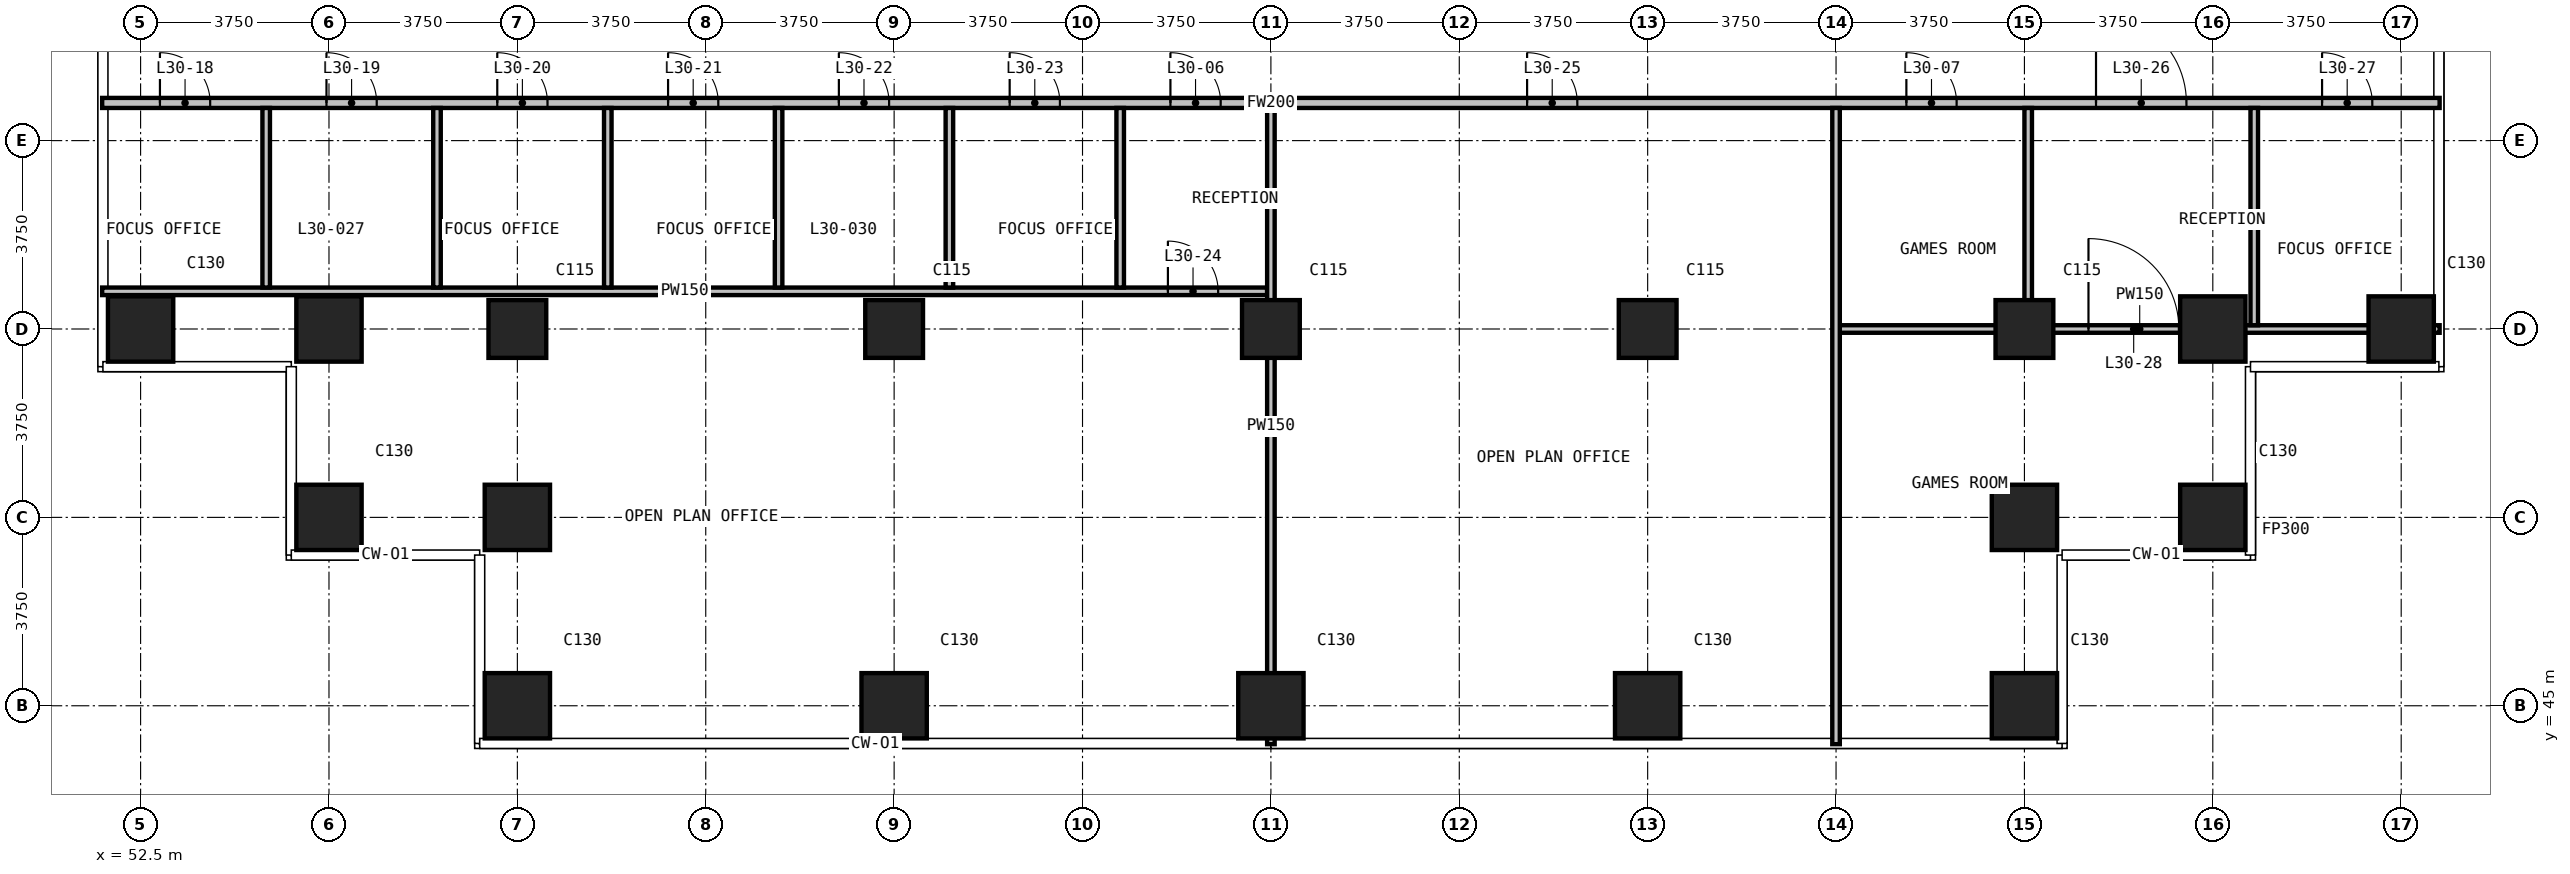
"""IFC4 building model, lengths in metres.
Left out: names, types, materials, properties, quantities, classifications, styles, units other than length and angle.
Written with IfcOpenShell. Run it as: python <this file> out.ifc"""

import sys

from ifc_helpers import new_model, si_unit, direction, frame, frame_2d, origin, origin_2d, place, context, subcontext, project, spatial, rectangle, extrude, element, fill, save


model = new_model("IFC4")
c1 = context("Model", 3, precision=1e-05, world=origin(), true_north=direction((0.0, 1.0)))
c2 = subcontext(c1, "Body", "Model", "MODEL_VIEW")
j1 = project(units=[si_unit("LENGTHUNIT", "METRE"), si_unit("PLANEANGLEUNIT", "RADIAN")], contexts=[c1])
p1 = place(None, origin())
s1 = spatial("IfcSite", under=j1, at=p1, CompositionType="ELEMENT")
p2 = place(p1, origin())
s2 = spatial("IfcBuilding", under=s1, at=p2, CompositionType="ELEMENT")
p3 = place(p2, frame((0.0, 0.0, 121.6)))
s3 = spatial("IfcBuildingStorey", under=s2, at=p3, CompositionType="ELEMENT", Elevation=121.6)
for number, where, z_axis, x_axis in (
    (1, (52.5, 52.5, 0.0), (0.0, 0.0, 1.0), (1.0, 0.0, 0.0)),
    (2, (56.25, 48.75, 0.0), (0.0, 0.0, 1.0), (1.0, 0.0, 0.0)),
    (3, (56.25, 52.5, 0.0), (0.0, 0.0, 1.0), (1.0, 0.0, 0.0)),
    (4, (60.0, 45.0, 0.0), (0.0, 0.0, 1.0), (1.0, 0.0, 0.0)),
    (5, (60.0, 48.75, 0.0), (0.0, 0.0, 1.0), (1.0, 0.0, 0.0)),
):
    element("IfcColumn", number, at=place(p3, frame(where, z_axis=z_axis, x_axis=x_axis)), inside=s3, PredefinedType="COLUMN", context=c2, shape_type="SweptSolid", body=[
        extrude(rectangle(XDim=1.3, YDim=1.3, at=origin_2d()), origin(), (0.0, 0.0, 1.0), 3.6),
    ])
p4 = place(p3, frame((60.0, 52.5, 0.0), z_axis=(0.0, 0.0, 1.0), x_axis=(1.0, 0.0, 0.0)))
e6 = element("IfcColumn", 6, at=p4, inside=s3, PredefinedType="COLUMN", context=c2, shape_type="SweptSolid", body=[
    extrude(rectangle(XDim=1.15, YDim=1.15, at=origin_2d()), origin(), (0.0, 0.0, 1.0), 3.6),
])
p5 = place(p3, frame((67.5, 45.0, 0.0), z_axis=(0.0, 0.0, 1.0), x_axis=(1.0, 0.0, 0.0)))
e7 = element("IfcColumn", 7, at=p5, inside=s3, PredefinedType="COLUMN", context=c2, shape_type="SweptSolid", body=[
    extrude(rectangle(XDim=1.3, YDim=1.3, at=origin_2d()), origin(), (0.0, 0.0, 1.0), 3.6),
])
p6 = place(p3, frame((67.5, 52.5, 0.0), z_axis=(0.0, 0.0, 1.0), x_axis=(1.0, 0.0, 0.0)))
e8 = element("IfcColumn", 8, at=p6, inside=s3, PredefinedType="COLUMN", context=c2, shape_type="SweptSolid", body=[
    extrude(rectangle(XDim=1.15, YDim=1.15, at=origin_2d()), origin(), (0.0, 0.0, 1.0), 3.6),
])
p7 = place(p3, frame((75.0, 45.0, 0.0), z_axis=(0.0, 0.0, 1.0), x_axis=(1.0, 0.0, 0.0)))
e9 = element("IfcColumn", 9, at=p7, inside=s3, PredefinedType="COLUMN", context=c2, shape_type="SweptSolid", body=[
    extrude(rectangle(XDim=1.3, YDim=1.3, at=origin_2d()), origin(), (0.0, 0.0, 1.0), 3.6),
])
p8 = place(p3, frame((75.0, 52.5, 0.0), z_axis=(0.0, 0.0, 1.0), x_axis=(1.0, 0.0, 0.0)))
e10 = element("IfcColumn", 10, at=p8, inside=s3, PredefinedType="COLUMN", context=c2, shape_type="SweptSolid", body=[
    extrude(rectangle(XDim=1.15, YDim=1.15, at=origin_2d()), origin(), (0.0, 0.0, 1.0), 3.6),
])
p9 = place(p3, frame((82.5, 45.0, 0.0), z_axis=(0.0, 0.0, 1.0), x_axis=(1.0, 0.0, 0.0)))
e11 = element("IfcColumn", 11, at=p9, inside=s3, PredefinedType="COLUMN", context=c2, shape_type="SweptSolid", body=[
    extrude(rectangle(XDim=1.3, YDim=1.3, at=origin_2d()), origin(), (0.0, 0.0, 1.0), 3.6),
])
p10 = place(p3, frame((82.5, 52.5, 0.0), z_axis=(0.0, 0.0, 1.0), x_axis=(1.0, 0.0, 0.0)))
e12 = element("IfcColumn", 12, at=p10, inside=s3, PredefinedType="COLUMN", context=c2, shape_type="SweptSolid", body=[
    extrude(rectangle(XDim=1.15, YDim=1.15, at=origin_2d()), origin(), (0.0, 0.0, 1.0), 3.6),
])
for number, where, z_axis, x_axis in (
    (13, (90.0, 45.0, 0.0), (0.0, 0.0, 1.0), (1.0, 0.0, 0.0)),
    (14, (90.0, 48.75, 0.0), (0.0, 0.0, 1.0), (1.0, 0.0, 0.0)),
):
    element("IfcColumn", number, at=place(p3, frame(where, z_axis=z_axis, x_axis=x_axis)), inside=s3, PredefinedType="COLUMN", context=c2, shape_type="SweptSolid", body=[
        extrude(rectangle(XDim=1.3, YDim=1.3, at=origin_2d()), origin(), (0.0, 0.0, 1.0), 3.6),
    ])
p11 = place(p3, frame((90.0, 52.5, 0.0), z_axis=(0.0, 0.0, 1.0), x_axis=(1.0, 0.0, 0.0)))
e15 = element("IfcColumn", 15, at=p11, inside=s3, PredefinedType="COLUMN", context=c2, shape_type="SweptSolid", body=[
    extrude(rectangle(XDim=1.15, YDim=1.15, at=origin_2d()), origin(), (0.0, 0.0, 1.0), 3.6),
])
for number, where, z_axis, x_axis in (
    (16, (93.75, 48.75, 0.0), (0.0, 0.0, 1.0), (1.0, 0.0, 0.0)),
    (17, (93.75, 52.5, 0.0), (0.0, 0.0, 1.0), (1.0, 0.0, 0.0)),
    (18, (97.5, 52.5, 0.0), (0.0, 0.0, 1.0), (1.0, 0.0, 0.0)),
):
    element("IfcColumn", number, at=place(p3, frame(where, z_axis=z_axis, x_axis=x_axis)), inside=s3, PredefinedType="COLUMN", context=c2, shape_type="SweptSolid", body=[
        extrude(rectangle(XDim=1.3, YDim=1.3, at=origin_2d()), origin(), (0.0, 0.0, 1.0), 3.6),
    ])
p12 = place(p3, frame((51.735, 57.0, 0.0), z_axis=(0.0, 0.0, 1.0), x_axis=(1.0, 0.0, 0.0)))
e19 = element("IfcWall", 19, at=p12, inside=s3, PredefinedType="PARTITIONING", context=c2, shape_type="SweptSolid", body=[
    extrude(rectangle(XDim=46.53, YDim=0.2, at=frame_2d((23.265, 0.0))), origin(), (0.0, 0.0, 1.0), 3.3),
])
p13 = place(p12, frame((21.265, 0.0, 0.0)))
e20 = element("IfcOpeningElement", 20, at=p13, cuts=e19, PredefinedType="OPENING", context=c2, shape_type="SweptSolid", body=[
    extrude(rectangle(XDim=1.0, YDim=2.2, at=frame_2d((0.5, 1.1))), frame((0.0, 0.11, 0.0), z_axis=(0.0, -1.0, 0.0), x_axis=(1.0, 0.0, 0.0)), (0.0, 0.0, 1.0), 0.22),
])
p14 = place(p12, frame((35.915, 0.0, 0.0)))
e21 = element("IfcOpeningElement", 21, at=p14, cuts=e19, PredefinedType="OPENING", context=c2, shape_type="SweptSolid", body=[
    extrude(rectangle(XDim=1.0, YDim=2.2, at=frame_2d((0.5, 1.1))), frame((0.0, 0.11, 0.0), z_axis=(0.0, -1.0, 0.0), x_axis=(1.0, 0.0, 0.0)), (0.0, 0.0, 1.0), 0.22),
])
p15 = place(p12, frame((1.15, 0.0, 0.0)))
e22 = element("IfcOpeningElement", 22, at=p15, cuts=e19, PredefinedType="OPENING", context=c2, shape_type="SweptSolid", body=[
    extrude(rectangle(XDim=1.0, YDim=2.2, at=frame_2d((0.5, 1.1))), frame((0.0, 0.11, 0.0), z_axis=(0.0, -1.0, 0.0), x_axis=(1.0, 0.0, 0.0)), (0.0, 0.0, 1.0), 0.22),
])
p16 = place(p12, frame((4.465, 0.0, 0.0)))
e23 = element("IfcOpeningElement", 23, at=p16, cuts=e19, PredefinedType="OPENING", context=c2, shape_type="SweptSolid", body=[
    extrude(rectangle(XDim=1.0, YDim=2.2, at=frame_2d((0.5, 1.1))), frame((0.0, 0.11, 0.0), z_axis=(0.0, -1.0, 0.0), x_axis=(1.0, 0.0, 0.0)), (0.0, 0.0, 1.0), 0.22),
])
p17 = place(p12, frame((7.865, 0.0, 0.0)))
e24 = element("IfcOpeningElement", 24, at=p17, cuts=e19, PredefinedType="OPENING", context=c2, shape_type="SweptSolid", body=[
    extrude(rectangle(XDim=1.0, YDim=2.2, at=frame_2d((0.5, 1.1))), frame((0.0, 0.11, 0.0), z_axis=(0.0, -1.0, 0.0), x_axis=(1.0, 0.0, 0.0)), (0.0, 0.0, 1.0), 0.22),
])
p18 = place(p12, frame((11.265, 0.0, 0.0)))
e25 = element("IfcOpeningElement", 25, at=p18, cuts=e19, PredefinedType="OPENING", context=c2, shape_type="SweptSolid", body=[
    extrude(rectangle(XDim=1.0, YDim=2.2, at=frame_2d((0.5, 1.1))), frame((0.0, 0.11, 0.0), z_axis=(0.0, -1.0, 0.0), x_axis=(1.0, 0.0, 0.0)), (0.0, 0.0, 1.0), 0.22),
])
p19 = place(p12, frame((14.665, 0.0, 0.0)))
e26 = element("IfcOpeningElement", 26, at=p19, cuts=e19, PredefinedType="OPENING", context=c2, shape_type="SweptSolid", body=[
    extrude(rectangle(XDim=1.0, YDim=2.2, at=frame_2d((0.5, 1.1))), frame((0.0, 0.11, 0.0), z_axis=(0.0, -1.0, 0.0), x_axis=(1.0, 0.0, 0.0)), (0.0, 0.0, 1.0), 0.22),
])
p20 = place(p12, frame((18.065, 0.0, 0.0)))
e27 = element("IfcOpeningElement", 27, at=p20, cuts=e19, PredefinedType="OPENING", context=c2, shape_type="SweptSolid", body=[
    extrude(rectangle(XDim=1.0, YDim=2.2, at=frame_2d((0.5, 1.1))), frame((0.0, 0.11, 0.0), z_axis=(0.0, -1.0, 0.0), x_axis=(1.0, 0.0, 0.0)), (0.0, 0.0, 1.0), 0.22),
])
p21 = place(p12, frame((28.365, 0.0, 0.0)))
e28 = element("IfcOpeningElement", 28, at=p21, cuts=e19, PredefinedType="OPENING", context=c2, shape_type="SweptSolid", body=[
    extrude(rectangle(XDim=1.0, YDim=2.2, at=frame_2d((0.5, 1.1))), frame((0.0, 0.11, 0.0), z_axis=(0.0, -1.0, 0.0), x_axis=(1.0, 0.0, 0.0)), (0.0, 0.0, 1.0), 0.22),
])
p22 = place(p12, frame((39.69, 0.0, 0.0)))
e29 = element("IfcOpeningElement", 29, at=p22, cuts=e19, PredefinedType="OPENING", context=c2, shape_type="SweptSolid", body=[
    extrude(rectangle(XDim=1.8, YDim=2.2, at=frame_2d((0.9, 1.1))), frame((0.0, 0.11, 0.0), z_axis=(0.0, -1.0, 0.0), x_axis=(1.0, 0.0, 0.0)), (0.0, 0.0, 1.0), 0.22),
])
p23 = place(p12, frame((44.19, 0.0, 0.0)))
e30 = element("IfcOpeningElement", 30, at=p23, cuts=e19, PredefinedType="OPENING", context=c2, shape_type="SweptSolid", body=[
    extrude(rectangle(XDim=1.0, YDim=2.2, at=frame_2d((0.5, 1.1))), frame((0.0, 0.11, 0.0), z_axis=(0.0, -1.0, 0.0), x_axis=(1.0, 0.0, 0.0)), (0.0, 0.0, 1.0), 0.22),
])
p24 = place(p3, frame((86.325, 52.5, 0.0), z_axis=(0.0, 0.0, 1.0), x_axis=(1.0, 0.0, 0.0)))
e31 = element("IfcWall", 31, at=p24, inside=s3, PredefinedType="PARTITIONING", context=c2, shape_type="SweptSolid", body=[
    extrude(rectangle(XDim=11.94, YDim=0.15, at=frame_2d((5.97, 0.0))), origin(), (0.0, 0.0, 1.0), 3.3),
])
p25 = place(p24, frame((4.95, 0.0, 0.0)))
e32 = element("IfcOpeningElement", 32, at=p25, cuts=e31, PredefinedType="OPENING", context=c2, shape_type="SweptSolid", body=[
    extrude(rectangle(XDim=1.8, YDim=2.2, at=frame_2d((0.9, 1.1))), frame((0.0, 0.085, 0.0), z_axis=(0.0, -1.0, 0.0), x_axis=(1.0, 0.0, 0.0)), (0.0, 0.0, 1.0), 0.17),
])
p26 = place(p3, frame((51.735, 53.25, 0.0), z_axis=(0.0, 0.0, 1.0), x_axis=(1.0, 0.0, 0.0)))
e33 = element("IfcWall", 33, at=p26, inside=s3, PredefinedType="PARTITIONING", context=c2, shape_type="SweptSolid", body=[
    extrude(rectangle(XDim=23.19, YDim=0.15, at=frame_2d((11.595, 0.0))), origin(), (0.0, 0.0, 1.0), 3.3),
])
p27 = place(p26, frame((21.215, 0.0, 0.0)))
e34 = element("IfcOpeningElement", 34, at=p27, cuts=e33, PredefinedType="OPENING", context=c2, shape_type="SweptSolid", body=[
    extrude(rectangle(XDim=1.0, YDim=2.2, at=frame_2d((0.5, 1.1))), frame((0.0, 0.085, 0.0), z_axis=(0.0, -1.0, 0.0), x_axis=(1.0, 0.0, 0.0)), (0.0, 0.0, 1.0), 0.17),
])
for number, where, z_axis, x_axis in (
    (35, (55.0, 53.325, 0.0), (0.0, 0.0, 1.0), (0.0, 1.0, 0.0)),
    (36, (58.4, 53.325, 0.0), (0.0, 0.0, 1.0), (0.0, 1.0, 0.0)),
    (37, (61.8, 53.325, 0.0), (0.0, 0.0, 1.0), (0.0, 1.0, 0.0)),
    (38, (65.2, 53.325, 0.0), (0.0, 0.0, 1.0), (0.0, 1.0, 0.0)),
    (39, (68.6, 53.325, 0.0), (0.0, 0.0, 1.0), (0.0, 1.0, 0.0)),
    (40, (72.0, 53.325, 0.0), (0.0, 0.0, 1.0), (0.0, 1.0, 0.0)),
):
    element("IfcWall", number, at=place(p3, frame(where, z_axis=z_axis, x_axis=x_axis)), inside=s3, PredefinedType="PARTITIONING", context=c2, shape_type="SweptSolid", body=[
        extrude(rectangle(XDim=3.575, YDim=0.15, at=frame_2d((1.788, 0.0))), origin(), (0.0, 0.0, 1.0), 3.3),
    ])
for number, where, z_axis, x_axis in (
    (41, (75.0, 44.235, 0.0), (0.0, 0.0, 1.0), (0.0, 1.0, 0.0)),
    (42, (86.25, 44.235, 0.0), (0.0, 0.0, 1.0), (0.0, 1.0, 0.0)),
):
    element("IfcWall", number, at=place(p3, frame(where, z_axis=z_axis, x_axis=x_axis)), inside=s3, PredefinedType="PARTITIONING", context=c2, shape_type="SweptSolid", body=[
        extrude(rectangle(XDim=12.665, YDim=0.15, at=frame_2d((6.333, 0.0))), origin(), (0.0, 0.0, 1.0), 3.3),
    ])
for number, where, z_axis, x_axis in (
    (43, (90.075, 52.575, 0.0), (0.0, 0.0, 1.0), (0.0, 1.0, 0.0)),
    (44, (94.575, 52.575, 0.0), (0.0, 0.0, 1.0), (0.0, 1.0, 0.0)),
):
    element("IfcWall", number, at=place(p3, frame(where, z_axis=z_axis, x_axis=x_axis)), inside=s3, PredefinedType="PARTITIONING", context=c2, shape_type="SweptSolid", body=[
        extrude(rectangle(XDim=4.325, YDim=0.15, at=frame_2d((2.163, 0.0))), origin(), (0.0, 0.0, 1.0), 3.3),
    ])
p28 = place(p13, origin())
e45 = element("IfcDoor", 45, at=p28, inside=s3, OperationType="SINGLE_SWING_LEFT", PredefinedType="DOOR", context=c2, shape_type="SweptSolid", body=[
    extrude(rectangle(XDim=1.0, YDim=2.2, at=frame_2d((0.5, 1.1))), frame((0.0, 0.025, 0.0), z_axis=(0.0, -1.0, 0.0), x_axis=(1.0, 0.0, 0.0)), (0.0, 0.0, 1.0), 0.05),
])
fill(e20, e45)
p29 = place(p14, origin())
e46 = element("IfcDoor", 46, at=p29, inside=s3, OperationType="SINGLE_SWING_LEFT", PredefinedType="DOOR", context=c2, shape_type="SweptSolid", body=[
    extrude(rectangle(XDim=1.0, YDim=2.2, at=frame_2d((0.5, 1.1))), frame((0.0, 0.025, 0.0), z_axis=(0.0, -1.0, 0.0), x_axis=(1.0, 0.0, 0.0)), (0.0, 0.0, 1.0), 0.05),
])
fill(e21, e46)
p30 = place(p15, origin())
e47 = element("IfcDoor", 47, at=p30, inside=s3, OperationType="SINGLE_SWING_LEFT", PredefinedType="DOOR", context=c2, shape_type="SweptSolid", body=[
    extrude(rectangle(XDim=1.0, YDim=2.2, at=frame_2d((0.5, 1.1))), frame((0.0, 0.025, 0.0), z_axis=(0.0, -1.0, 0.0), x_axis=(1.0, 0.0, 0.0)), (0.0, 0.0, 1.0), 0.05),
])
fill(e22, e47)
p31 = place(p16, origin())
e48 = element("IfcDoor", 48, at=p31, inside=s3, OperationType="SINGLE_SWING_LEFT", PredefinedType="DOOR", context=c2, shape_type="SweptSolid", body=[
    extrude(rectangle(XDim=1.0, YDim=2.2, at=frame_2d((0.5, 1.1))), frame((0.0, 0.025, 0.0), z_axis=(0.0, -1.0, 0.0), x_axis=(1.0, 0.0, 0.0)), (0.0, 0.0, 1.0), 0.05),
])
fill(e23, e48)
p32 = place(p17, origin())
e49 = element("IfcDoor", 49, at=p32, inside=s3, OperationType="SINGLE_SWING_LEFT", PredefinedType="DOOR", context=c2, shape_type="SweptSolid", body=[
    extrude(rectangle(XDim=1.0, YDim=2.2, at=frame_2d((0.5, 1.1))), frame((0.0, 0.025, 0.0), z_axis=(0.0, -1.0, 0.0), x_axis=(1.0, 0.0, 0.0)), (0.0, 0.0, 1.0), 0.05),
])
fill(e24, e49)
p33 = place(p18, origin())
e50 = element("IfcDoor", 50, at=p33, inside=s3, OperationType="SINGLE_SWING_LEFT", PredefinedType="DOOR", context=c2, shape_type="SweptSolid", body=[
    extrude(rectangle(XDim=1.0, YDim=2.2, at=frame_2d((0.5, 1.1))), frame((0.0, 0.025, 0.0), z_axis=(0.0, -1.0, 0.0), x_axis=(1.0, 0.0, 0.0)), (0.0, 0.0, 1.0), 0.05),
])
fill(e25, e50)
p34 = place(p19, origin())
e51 = element("IfcDoor", 51, at=p34, inside=s3, OperationType="SINGLE_SWING_LEFT", PredefinedType="DOOR", context=c2, shape_type="SweptSolid", body=[
    extrude(rectangle(XDim=1.0, YDim=2.2, at=frame_2d((0.5, 1.1))), frame((0.0, 0.025, 0.0), z_axis=(0.0, -1.0, 0.0), x_axis=(1.0, 0.0, 0.0)), (0.0, 0.0, 1.0), 0.05),
])
fill(e26, e51)
p35 = place(p20, origin())
e52 = element("IfcDoor", 52, at=p35, inside=s3, OperationType="SINGLE_SWING_LEFT", PredefinedType="DOOR", context=c2, shape_type="SweptSolid", body=[
    extrude(rectangle(XDim=1.0, YDim=2.2, at=frame_2d((0.5, 1.1))), frame((0.0, 0.025, 0.0), z_axis=(0.0, -1.0, 0.0), x_axis=(1.0, 0.0, 0.0)), (0.0, 0.0, 1.0), 0.05),
])
fill(e27, e52)
p36 = place(p27, origin())
e53 = element("IfcDoor", 53, at=p36, inside=s3, OperationType="SINGLE_SWING_LEFT", PredefinedType="DOOR", context=c2, shape_type="SweptSolid", body=[
    extrude(rectangle(XDim=1.0, YDim=2.2, at=frame_2d((0.5, 1.1))), frame((0.0, 0.025, 0.0), z_axis=(0.0, -1.0, 0.0), x_axis=(1.0, 0.0, 0.0)), (0.0, 0.0, 1.0), 0.05),
])
fill(e34, e53)
p37 = place(p21, origin())
e54 = element("IfcDoor", 54, at=p37, inside=s3, OperationType="SINGLE_SWING_RIGHT", PredefinedType="DOOR", context=c2, shape_type="SweptSolid", body=[
    extrude(rectangle(XDim=1.0, YDim=2.2, at=frame_2d((0.5, 1.1))), frame((0.0, 0.025, 0.0), z_axis=(0.0, -1.0, 0.0), x_axis=(1.0, 0.0, 0.0)), (0.0, 0.0, 1.0), 0.05),
])
fill(e28, e54)
p38 = place(p22, origin())
e55 = element("IfcDoor", 55, at=p38, inside=s3, OperationType="DOUBLE_DOOR_SINGLE_SWING", PredefinedType="DOOR", context=c2, shape_type="SweptSolid", body=[
    extrude(rectangle(XDim=1.8, YDim=2.2, at=frame_2d((0.9, 1.1))), frame((0.0, 0.025, 0.0), z_axis=(0.0, -1.0, 0.0), x_axis=(1.0, 0.0, 0.0)), (0.0, 0.0, 1.0), 0.05),
])
fill(e29, e55)
p39 = place(p23, origin())
e56 = element("IfcDoor", 56, at=p39, inside=s3, OperationType="SINGLE_SWING_RIGHT", PredefinedType="DOOR", context=c2, shape_type="SweptSolid", body=[
    extrude(rectangle(XDim=1.0, YDim=2.2, at=frame_2d((0.5, 1.1))), frame((0.0, 0.025, 0.0), z_axis=(0.0, -1.0, 0.0), x_axis=(1.0, 0.0, 0.0)), (0.0, 0.0, 1.0), 0.05),
])
fill(e30, e56)
p40 = place(p25, origin())
e57 = element("IfcDoor", 57, at=p40, inside=s3, OperationType="DOUBLE_DOOR_SINGLE_SWING", PredefinedType="DOOR", context=c2, shape_type="SweptSolid", body=[
    extrude(rectangle(XDim=1.8, YDim=2.2, at=frame_2d((0.9, 1.1))), frame((0.0, 0.025, 0.0), z_axis=(0.0, -1.0, 0.0), x_axis=(1.0, 0.0, 0.0)), (0.0, 0.0, 1.0), 0.05),
])
fill(e32, e57)
save(model, sys.argv[1])
